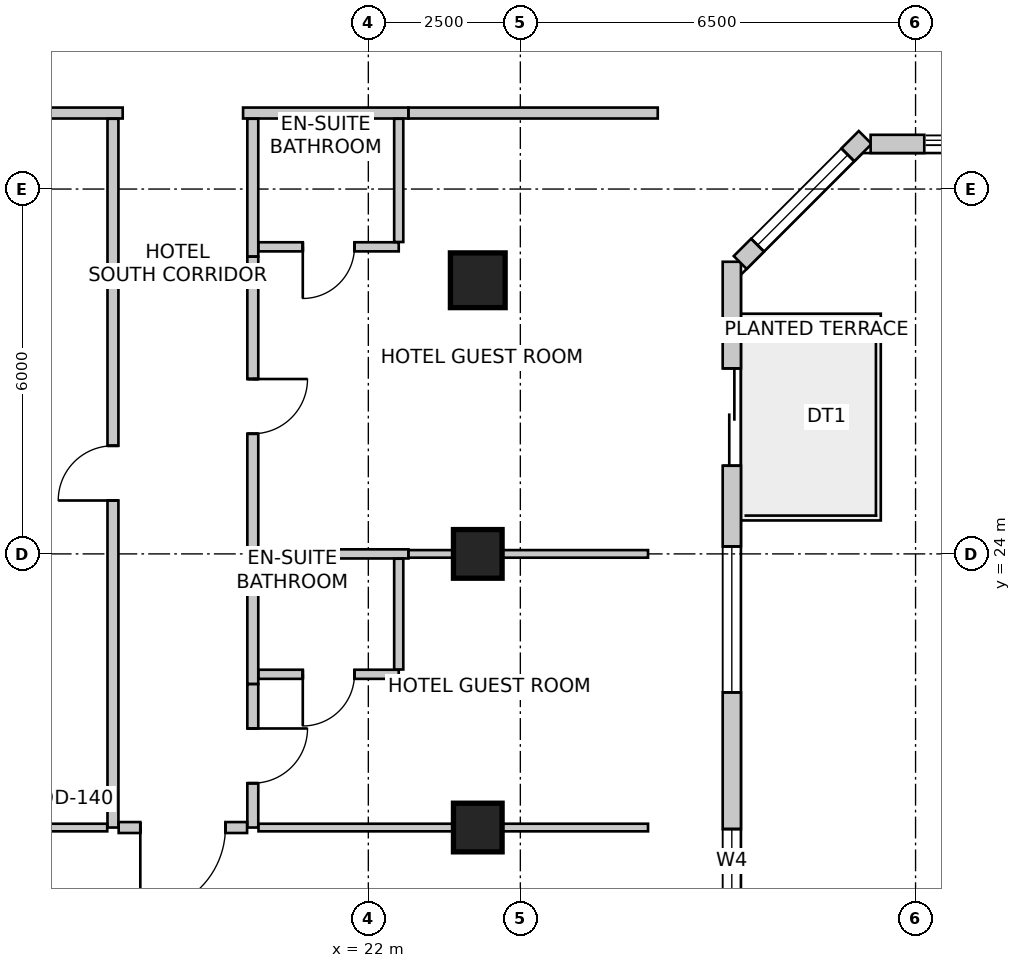
"""IFC4 building model, lengths in metres.
Left out: names, types, materials, properties, quantities, classifications, styles, units other than length and angle.
Written with IfcOpenShell. Run it as: python <this file> out.ifc"""

import sys

from ifc_helpers import new_model, si_unit, direction, frame, frame_2d, origin, origin_2d, place, context, subcontext, project, spatial, rectangle, extrude, source, transform, mapped, element, fill, save


model = new_model("IFC4")
c1 = context("Model", 3, precision=1e-05, world=origin(), true_north=direction((0.0, 1.0)))
c2 = subcontext(c1, "Body", "Model", "MODEL_VIEW")
j1 = project(units=[si_unit("LENGTHUNIT", "METRE"), si_unit("PLANEANGLEUNIT", "RADIAN")], contexts=[c1])
p1 = place(None, origin())
s1 = spatial("IfcSite", under=j1, at=p1, CompositionType="ELEMENT")
p2 = place(p1, origin())
s2 = spatial("IfcBuilding", under=s1, at=p2, CompositionType="ELEMENT")
p3 = place(p2, frame((0.0, 0.0, 150.2)))
s3 = spatial("IfcBuildingStorey", under=s2, at=p3, CompositionType="ELEMENT", Elevation=150.2)
m1 = source(origin(), c2, "Body", "SweptSolid", [
    extrude(rectangle(XDim=0.9, YDim=0.9, at=origin_2d()), origin(), (0.0, 0.0, 1.0), 3.6),
])
p4 = place(p3, frame((23.8, 28.5, 0.0), z_axis=(0.0, 0.0, 1.0), x_axis=(1.0, 0.0, 0.0)))
e1 = element("IfcColumn", 1, at=p4, inside=s3, PredefinedType="COLUMN", context=c2, shape_type="MappedRepresentation", body=[
    mapped(m1, transform((0.0, 0.0, 0.0), scale=1.0)),
])
m2 = source(origin(), c2, "Body", "SweptSolid", [
    extrude(rectangle(XDim=0.8, YDim=0.8, at=origin_2d()), origin(), (0.0, 0.0, 1.0), 3.6),
])
for number, where, z_axis, x_axis in (
    (2, (23.8, 24.0, 0.0), (0.0, 0.0, 1.0), (1.0, 0.0, 0.0)),
    (3, (23.8, 19.5, 0.0), (0.0, 0.0, 1.0), (1.0, 0.0, 0.0)),
):
    element("IfcColumn", number, at=place(p3, frame(where, z_axis=z_axis, x_axis=x_axis)), inside=s3, PredefinedType="COLUMN", context=c2, shape_type="MappedRepresentation", body=[
        mapped(m2, transform((0.0, 0.0, 0.0), scale=1.0)),
    ])
p5 = place(p3, frame((27.978, 15.857, 0.0), z_axis=(0.0, 0.0, 1.0), x_axis=(0.0, 1.0, 0.0)))
e4 = element("IfcWall", 4, at=p5, inside=s3, PredefinedType="SOLIDWALL", context=c2, shape_type="SweptSolid", body=[
    extrude(rectangle(XDim=12.947, YDim=0.3, at=frame_2d((6.473, 0.0))), origin(), (0.0, 0.0, 1.0), 3.35),
])
m3 = source(origin(), c2, "Body", "SweptSolid", [
    extrude(rectangle(XDim=1.6, YDim=2.15, at=frame_2d((0.8, 1.075))), frame((0.0, 0.16, 0.0), z_axis=(0.0, -1.0, 0.0), x_axis=(1.0, 0.0, 0.0)), (0.0, 0.0, 1.0), 0.32),
])
p6 = place(p5, frame((9.593, 0.0, 0.0)))
e5 = element("IfcOpeningElement", 5, at=p6, cuts=e4, PredefinedType="OPENING", context=c2, shape_type="MappedRepresentation", body=[
    mapped(m3, transform((0.0, 0.0, 0.0), scale=1.0)),
])
m4 = source(origin(), c2, "Body", "SweptSolid", [
    extrude(rectangle(XDim=2.1, YDim=2.0, at=frame_2d((1.05, 1.0))), frame((0.0, 0.16, 0.0), z_axis=(0.0, -1.0, 0.0), x_axis=(1.0, 0.0, 0.0)), (0.0, 0.0, 1.0), 0.32),
])
p7 = place(p5, frame((1.518, 0.0, 0.85)))
e6 = element("IfcOpeningElement", 6, at=p7, cuts=e4, PredefinedType="OPENING", context=c2, shape_type="MappedRepresentation", body=[
    mapped(m4, transform((0.0, 0.0, 0.0), scale=1.0)),
])
m5 = source(origin(), c2, "Body", "SweptSolid", [
    extrude(rectangle(XDim=2.4, YDim=2.2, at=frame_2d((1.2, 1.1))), frame((0.0, 0.16, 0.0), z_axis=(0.0, -1.0, 0.0), x_axis=(1.0, 0.0, 0.0)), (0.0, 0.0, 1.0), 0.32),
])
p8 = place(p5, frame((5.865, 0.0, 0.85)))
e7 = element("IfcOpeningElement", 7, at=p8, cuts=e4, PredefinedType="OPENING", context=c2, shape_type="MappedRepresentation", body=[
    mapped(m5, transform((0.0, 0.0, 0.0), scale=1.0)),
])
p9 = place(p3, frame((28.116, 28.792, 0.0), z_axis=(0.0, 0.0, 1.0), x_axis=(0.707064797706, 0.707148762175, 0.0)))
e8 = element("IfcWall", 8, at=p9, inside=s3, PredefinedType="SOLIDWALL", context=c2, shape_type="SweptSolid", body=[
    extrude(rectangle(XDim=2.908, YDim=0.3, at=frame_2d((1.454, 0.0))), origin(), (0.0, 0.0, 1.0), 3.35),
])
p10 = place(p9, frame((0.404, 0.0, 0.85)))
e9 = element("IfcOpeningElement", 9, at=p10, cuts=e8, PredefinedType="OPENING", context=c2, shape_type="MappedRepresentation", body=[
    mapped(m4, transform((0.0, 0.0, 0.0), scale=1.0)),
])
p11 = place(p3, frame((30.261, 30.742, 0.0), z_axis=(0.0, 0.0, 1.0), x_axis=(1.0, 0.0, 0.0)))
e10 = element("IfcWall", 10, at=p11, inside=s3, PredefinedType="SOLIDWALL", context=c2, shape_type="SweptSolid", body=[
    extrude(rectangle(XDim=0.882, YDim=0.3, at=frame_2d((0.441, 0.0))), origin(), (0.0, 0.0, 1.0), 3.35),
])
p12 = place(p3, frame((17.96, 31.25, 0.0), z_axis=(0.0, 0.0, 1.0), x_axis=(-1.0, 0.0, 0.0)))
e11 = element("IfcWall", 11, at=p12, inside=s3, PredefinedType="PARTITIONING", context=c2, shape_type="SweptSolid", body=[
    extrude(rectangle(XDim=5.366, YDim=0.18, at=frame_2d((2.683, 0.0))), origin(), (0.0, 0.0, 1.0), 3.019),
])
p13 = place(p3, frame((22.66, 31.25, 0.0), z_axis=(0.0, 0.0, 1.0), x_axis=(-1.0, 0.0, 0.0)))
e12 = element("IfcWall", 12, at=p13, inside=s3, PredefinedType="PARTITIONING", context=c2, shape_type="SweptSolid", body=[
    extrude(rectangle(XDim=2.72, YDim=0.18, at=frame_2d((1.36, 0.0))), origin(), (0.0, 0.0, 1.0), 3.019),
])
p14 = place(p3, frame((26.76, 31.25, 0.0), z_axis=(0.0, 0.0, 1.0), x_axis=(-1.0, 0.0, 0.0)))
e13 = element("IfcWall", 13, at=p14, inside=s3, PredefinedType="PARTITIONING", context=c2, shape_type="SweptSolid", body=[
    extrude(rectangle(XDim=4.098, YDim=0.18, at=frame_2d((2.049, 0.0))), origin(), (0.0, 0.0, 1.0), 3.35),
])
p15 = place(p3, frame((17.8, 19.5, 0.0), z_axis=(0.0, 0.0, 1.0), x_axis=(0.0, 1.0, 0.0)))
e14 = element("IfcWall", 14, at=p15, inside=s3, PredefinedType="PARTITIONING", context=c2, shape_type="SweptSolid", body=[
    extrude(rectangle(XDim=11.656, YDim=0.18, at=frame_2d((5.828, 0.0))), origin(), (0.0, 0.0, 1.0), 2.803),
])
m6 = source(origin(), c2, "Body", "SweptSolid", [
    extrude(rectangle(XDim=0.9, YDim=2.15, at=frame_2d((0.45, 1.075))), frame((0.0, 0.1, 0.0), z_axis=(0.0, -1.0, 0.0), x_axis=(1.0, 0.0, 0.0)), (0.0, 0.0, 1.0), 0.2),
])
p16 = place(p15, frame((5.378, 0.0, 0.0)))
e15 = element("IfcOpeningElement", 15, at=p16, cuts=e14, PredefinedType="OPENING", context=c2, shape_type="MappedRepresentation", body=[
    mapped(m6, transform((0.0, 0.0, 0.0), scale=1.0)),
])
p17 = place(p3, frame((20.1, 31.156, 0.0), z_axis=(0.0, 0.0, 1.0), x_axis=(0.0, -1.0, 0.0)))
e16 = element("IfcWall", 16, at=p17, inside=s3, PredefinedType="PARTITIONING", context=c2, shape_type="SweptSolid", body=[
    extrude(rectangle(XDim=2.266, YDim=0.18, at=frame_2d((1.133, 0.0))), origin(), (0.0, 0.0, 1.0), 3.019),
])
p18 = place(p3, frame((20.1, 28.888, 0.0), z_axis=(0.0, 0.0, 1.0), x_axis=(0.0, -1.0, 0.0)))
e17 = element("IfcWall", 17, at=p18, inside=s3, PredefinedType="PARTITIONING", context=c2, shape_type="SweptSolid", body=[
    extrude(rectangle(XDim=5.048, YDim=0.18, at=frame_2d((2.524, 0.0))), origin(), (0.0, 0.0, 1.0), 2.803),
])
p19 = place(p18, frame((2.012, 0.0, 0.0)))
e18 = element("IfcOpeningElement", 18, at=p19, cuts=e17, PredefinedType="OPENING", context=c2, shape_type="MappedRepresentation", body=[
    mapped(m6, transform((0.0, 0.0, 0.0), scale=1.0)),
])
p20 = place(p3, frame((20.1, 23.838, 0.0), z_axis=(0.0, 0.0, 1.0), x_axis=(0.0, -1.0, 0.0)))
e19 = element("IfcWall", 19, at=p20, inside=s3, PredefinedType="PARTITIONING", context=c2, shape_type="SweptSolid", body=[
    extrude(rectangle(XDim=1.978, YDim=0.18, at=frame_2d((0.989, 0.0))), origin(), (0.0, 0.0, 1.0), 3.35),
])
p21 = place(p3, frame((20.1, 21.858, 0.0), z_axis=(0.0, 0.0, 1.0), x_axis=(0.0, -1.0, 0.0)))
e20 = element("IfcWall", 20, at=p21, inside=s3, PredefinedType="PARTITIONING", context=c2, shape_type="SweptSolid", body=[
    extrude(rectangle(XDim=2.358, YDim=0.18, at=frame_2d((1.179, 0.0))), origin(), (0.0, 0.0, 1.0), 2.879),
])
p22 = place(p21, frame((0.729, 0.0, 0.0)))
e21 = element("IfcOpeningElement", 21, at=p22, cuts=e20, PredefinedType="OPENING", context=c2, shape_type="MappedRepresentation", body=[
    mapped(m6, transform((0.0, 0.0, 0.0), scale=1.0)),
])
p23 = place(p3, frame((20.006, 19.5, 0.0), z_axis=(0.0, 0.0, 1.0), x_axis=(-1.0, 0.0, 0.0)))
e22 = element("IfcWall", 22, at=p23, inside=s3, PredefinedType="PARTITIONING", context=c2, shape_type="SweptSolid", body=[
    extrude(rectangle(XDim=2.112, YDim=0.18, at=frame_2d((1.056, 0.0))), origin(), (0.0, 0.0, 1.0), 3.35),
])
m7 = source(origin(), c2, "Body", "SweptSolid", [
    extrude(rectangle(XDim=1.4, YDim=2.15, at=frame_2d((0.7, 1.075))), frame((0.0, 0.1, 0.0), z_axis=(0.0, -1.0, 0.0), x_axis=(1.0, 0.0, 0.0)), (0.0, 0.0, 1.0), 0.2),
])
p24 = place(p23, frame((0.356, 0.0, 0.0)))
e23 = element("IfcOpeningElement", 23, at=p24, cuts=e22, PredefinedType="OPENING", context=c2, shape_type="MappedRepresentation", body=[
    mapped(m7, transform((0.0, 0.0, 0.0), scale=1.0)),
])
p25 = place(p3, frame((17.706, 19.5, 0.0), z_axis=(0.0, 0.0, 1.0), x_axis=(-1.0, 0.0, 0.0)))
e24 = element("IfcWall", 24, at=p25, inside=s3, PredefinedType="PARTITIONING", context=c2, shape_type="SweptSolid", body=[
    extrude(rectangle(XDim=6.899, YDim=0.125, at=frame_2d((3.45, 0.0))), origin(), (0.0, 0.0, 1.0), 3.35),
])
p26 = place(p3, frame((22.5, 29.05, 0.0), z_axis=(0.0, 0.0, 1.0), x_axis=(-1.0, 0.0, 0.0)))
e25 = element("IfcWall", 25, at=p26, inside=s3, PredefinedType="PARTITIONING", context=c2, shape_type="SweptSolid", body=[
    extrude(rectangle(XDim=2.306, YDim=0.15, at=frame_2d((1.153, 0.0))), origin(), (0.0, 0.0, 1.0), 3.019),
])
m8 = source(origin(), c2, "Body", "SweptSolid", [
    extrude(rectangle(XDim=0.85, YDim=2.15, at=frame_2d((0.425, 1.075))), frame((0.0, 0.085, 0.0), z_axis=(0.0, -1.0, 0.0), x_axis=(1.0, 0.0, 0.0)), (0.0, 0.0, 1.0), 0.17),
])
p27 = place(p26, frame((0.728, 0.0, 0.0)))
e26 = element("IfcOpeningElement", 26, at=p27, cuts=e25, PredefinedType="OPENING", context=c2, shape_type="MappedRepresentation", body=[
    mapped(m8, transform((0.0, 0.0, 0.0), scale=1.0)),
])
p28 = place(p3, frame((22.5, 31.156, 0.0), z_axis=(0.0, 0.0, 1.0), x_axis=(0.0, -1.0, 0.0)))
e27 = element("IfcWall", 27, at=p28, inside=s3, PredefinedType="PARTITIONING", context=c2, shape_type="SweptSolid", body=[
    extrude(rectangle(XDim=2.027, YDim=0.15, at=frame_2d((1.014, 0.0))), origin(), (0.0, 0.0, 1.0), 3.019),
])
p29 = place(p3, frame((22.66, 24.0, 0.0), z_axis=(0.0, 0.0, 1.0), x_axis=(-1.0, 0.0, 0.0)))
e28 = element("IfcWall", 28, at=p29, inside=s3, PredefinedType="PARTITIONING", context=c2, shape_type="SweptSolid", body=[
    extrude(rectangle(XDim=2.466, YDim=0.15, at=frame_2d((1.233, 0.0))), origin(), (0.0, 0.0, 1.0), 2.803),
])
p30 = place(p3, frame((26.6, 24.0, 0.0), z_axis=(0.0, 0.0, 1.0), x_axis=(-1.0, 0.0, 0.0)))
e29 = element("IfcWall", 29, at=p30, inside=s3, PredefinedType="PARTITIONING", context=c2, shape_type="SweptSolid", body=[
    extrude(rectangle(XDim=3.938, YDim=0.125, at=frame_2d((1.969, 0.0))), origin(), (0.0, 0.0, 1.0), 2.492),
])
p31 = place(p3, frame((22.5, 22.02, 0.0), z_axis=(0.0, 0.0, 1.0), x_axis=(-1.0, 0.0, 0.0)))
e30 = element("IfcWall", 30, at=p31, inside=s3, PredefinedType="PARTITIONING", context=c2, shape_type="SweptSolid", body=[
    extrude(rectangle(XDim=2.306, YDim=0.15, at=frame_2d((1.153, 0.0))), origin(), (0.0, 0.0, 1.0), 3.35),
])
p32 = place(p31, frame((0.728, 0.0, 0.0)))
e31 = element("IfcOpeningElement", 31, at=p32, cuts=e30, PredefinedType="OPENING", context=c2, shape_type="MappedRepresentation", body=[
    mapped(m8, transform((0.0, 0.0, 0.0), scale=1.0)),
])
p33 = place(p3, frame((22.5, 23.921, 0.0), z_axis=(0.0, 0.0, 1.0), x_axis=(0.0, -1.0, 0.0)))
e32 = element("IfcWall", 32, at=p33, inside=s3, PredefinedType="PARTITIONING", context=c2, shape_type="SweptSolid", body=[
    extrude(rectangle(XDim=1.822, YDim=0.15, at=frame_2d((0.911, 0.0))), origin(), (0.0, 0.0, 1.0), 3.35),
])
p34 = place(p3, frame((26.6, 19.5, 0.0), z_axis=(0.0, 0.0, 1.0), x_axis=(-1.0, 0.0, 0.0)))
e33 = element("IfcWall", 33, at=p34, inside=s3, PredefinedType="PARTITIONING", context=c2, shape_type="SweptSolid", body=[
    extrude(rectangle(XDim=6.406, YDim=0.125, at=frame_2d((3.203, 0.0))), origin(), (0.0, 0.0, 1.0), 2.492),
])
m9 = source(origin(), c2, "Body", "SweptSolid", [
    extrude(rectangle(XDim=1.6, YDim=2.15, at=frame_2d((0.8, 1.075))), frame((0.0, 0.025, 0.0), z_axis=(0.0, -1.0, 0.0), x_axis=(1.0, 0.0, 0.0)), (0.0, 0.0, 1.0), 0.05),
])
p35 = place(p6, origin())
e34 = element("IfcDoor", 34, at=p35, inside=s3, OperationType="DOUBLE_DOOR_SLIDING", PredefinedType="DOOR", context=c2, shape_type="MappedRepresentation", body=[
    mapped(m9, transform((0.0, 0.0, 0.0), scale=1.0)),
])
fill(e5, e34)
m10 = source(origin(), c2, "Body", "SweptSolid", [
    extrude(rectangle(XDim=2.1, YDim=2.0, at=frame_2d((1.05, 1.0))), frame((0.0, -0.015, 0.0), z_axis=(0.0, -1.0, 0.0), x_axis=(1.0, 0.0, 0.0)), (0.0, 0.0, 1.0), 0.06),
])
p36 = place(p7, origin())
e35 = element("IfcWindow", 35, at=p36, inside=s3, PartitioningType="SINGLE_PANEL", PredefinedType="WINDOW", context=c2, shape_type="MappedRepresentation", body=[
    mapped(m10, transform((0.0, 0.0, 0.0), scale=1.0)),
])
fill(e6, e35)
m11 = source(origin(), c2, "Body", "SweptSolid", [
    extrude(rectangle(XDim=2.4, YDim=2.2, at=frame_2d((1.2, 1.1))), frame((0.0, -0.015, 0.0), z_axis=(0.0, -1.0, 0.0), x_axis=(1.0, 0.0, 0.0)), (0.0, 0.0, 1.0), 0.06),
])
p37 = place(p8, origin())
e36 = element("IfcWindow", 36, at=p37, inside=s3, PartitioningType="SINGLE_PANEL", PredefinedType="WINDOW", context=c2, shape_type="MappedRepresentation", body=[
    mapped(m11, transform((0.0, 0.0, 0.0), scale=1.0)),
])
fill(e7, e36)
p38 = place(p10, origin())
e37 = element("IfcWindow", 37, at=p38, inside=s3, PartitioningType="SINGLE_PANEL", PredefinedType="WINDOW", context=c2, shape_type="MappedRepresentation", body=[
    mapped(m10, transform((0.0, 0.0, 0.0), scale=1.0)),
])
fill(e9, e37)
m12 = source(origin(), c2, "Body", "SweptSolid", [
    extrude(rectangle(XDim=0.9, YDim=2.15, at=frame_2d((0.45, 1.075))), frame((0.0, 0.025, 0.0), z_axis=(0.0, -1.0, 0.0), x_axis=(1.0, 0.0, 0.0)), (0.0, 0.0, 1.0), 0.05),
])
p39 = place(p16, origin())
e38 = element("IfcDoor", 38, at=p39, inside=s3, OperationType="SINGLE_SWING_LEFT", PredefinedType="DOOR", context=c2, shape_type="MappedRepresentation", body=[
    mapped(m12, transform((0.0, 0.0, 0.0), scale=1.0)),
])
fill(e15, e38)
m13 = source(origin(), c2, "Body", "SweptSolid", [
    extrude(rectangle(XDim=0.85, YDim=2.15, at=frame_2d((0.425, 1.075))), frame((0.0, 0.025, 0.0), z_axis=(0.0, -1.0, 0.0), x_axis=(1.0, 0.0, 0.0)), (0.0, 0.0, 1.0), 0.05),
])
p40 = place(p27, origin())
e39 = element("IfcDoor", 39, at=p40, inside=s3, OperationType="SINGLE_SWING_RIGHT", PredefinedType="DOOR", context=c2, shape_type="MappedRepresentation", body=[
    mapped(m13, transform((0.0, 0.0, 0.0), scale=1.0)),
])
fill(e26, e39)
p41 = place(p19, origin())
e40 = element("IfcDoor", 40, at=p41, inside=s3, OperationType="SINGLE_SWING_LEFT", PredefinedType="DOOR", context=c2, shape_type="MappedRepresentation", body=[
    mapped(m12, transform((0.0, 0.0, 0.0), scale=1.0)),
])
fill(e18, e40)
p42 = place(p32, origin())
e41 = element("IfcDoor", 41, at=p42, inside=s3, OperationType="SINGLE_SWING_RIGHT", PredefinedType="DOOR", context=c2, shape_type="MappedRepresentation", body=[
    mapped(m13, transform((0.0, 0.0, 0.0), scale=1.0)),
])
fill(e31, e41)
p43 = place(p22, origin())
e42 = element("IfcDoor", 42, at=p43, inside=s3, OperationType="SINGLE_SWING_LEFT", PredefinedType="DOOR", context=c2, shape_type="MappedRepresentation", body=[
    mapped(m12, transform((0.0, 0.0, 0.0), scale=1.0)),
])
fill(e21, e42)
m14 = source(origin(), c2, "Body", "SweptSolid", [
    extrude(rectangle(XDim=1.4, YDim=2.15, at=frame_2d((0.7, 1.075))), frame((0.0, 0.025, 0.0), z_axis=(0.0, -1.0, 0.0), x_axis=(1.0, 0.0, 0.0)), (0.0, 0.0, 1.0), 0.05),
])
p44 = place(p24, origin())
e43 = element("IfcDoor", 43, at=p44, inside=s3, OperationType="SINGLE_SWING_RIGHT", PredefinedType="DOOR", context=c2, shape_type="MappedRepresentation", body=[
    mapped(m14, transform((0.0, 0.0, 0.0), scale=1.0)),
])
fill(e23, e43)
save(model, sys.argv[1])
